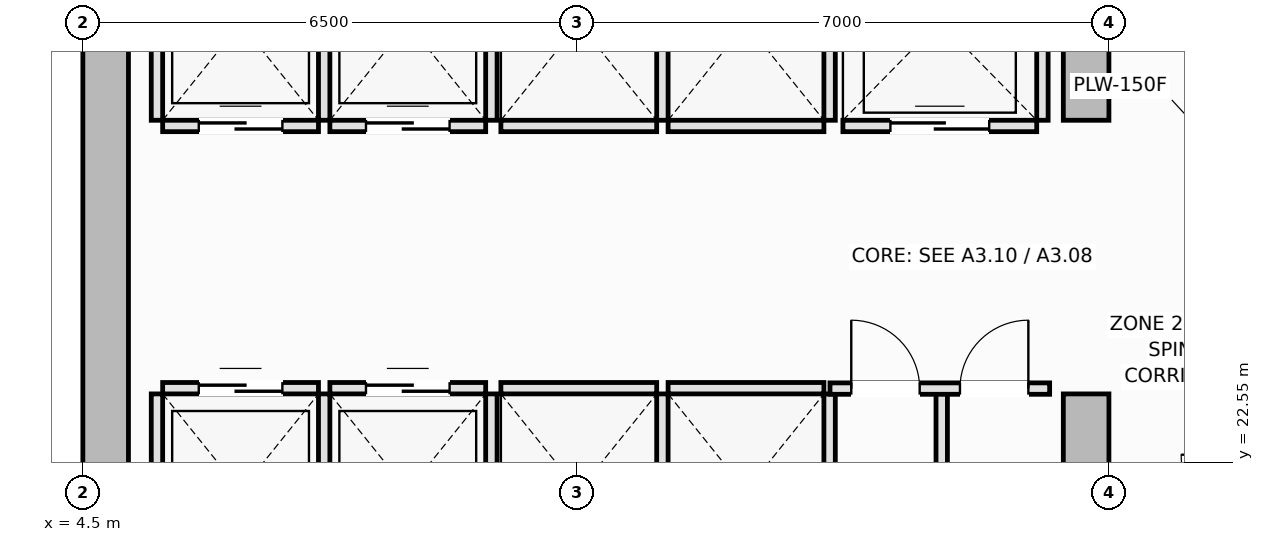
"""IFC4 building model, lengths in metres.
Left out: names, types, materials, properties, quantities, classifications, styles, units other than length and angle.
Written with IfcOpenShell. Run it as: python <this file> out.ifc"""

import sys

from ifc_helpers import new_model, si_unit, direction, frame, frame_2d, origin, place, context, subcontext, project, spatial, rectangle, extrude, element, fill, save


model = new_model("IFC4")
c1 = context("Model", 3, precision=1e-05, world=origin(), true_north=direction((0.0, 1.0)))
c2 = subcontext(c1, "Body", "Model", "MODEL_VIEW")
j1 = project(units=[si_unit("LENGTHUNIT", "METRE"), si_unit("PLANEANGLEUNIT", "RADIAN")], contexts=[c1])
p1 = place(None, origin())
s1 = spatial("IfcSite", under=j1, at=p1, CompositionType="ELEMENT")
p2 = place(p1, origin())
s2 = spatial("IfcBuilding", under=s1, at=p2, CompositionType="ELEMENT")
p3 = place(p2, frame((0.0, 0.0, 159.05)))
s3 = spatial("IfcBuildingStorey", under=s2, at=p3, CompositionType="ELEMENT", Elevation=159.05)
p4 = place(p3, frame((4.8, 14.6, 0.0), z_axis=(0.0, 0.0, 1.0), x_axis=(0.0, 1.0, 0.0)))
e1 = element("IfcWall", 1, at=p4, inside=s3, PredefinedType="SHEAR", context=c2, shape_type="SweptSolid", body=[
    extrude(rectangle(XDim=21.3, YDim=0.6, at=frame_2d((10.65, 0.0))), origin(), (0.0, 0.0, 1.0), 3.55),
])
p5 = place(p3, frame((17.7, 14.6, 0.0), z_axis=(0.0, 0.0, 1.0), x_axis=(0.0, 1.0, 0.0)))
e2 = element("IfcWall", 2, at=p5, inside=s3, PredefinedType="SHEAR", context=c2, shape_type="SweptSolid", body=[
    extrude(rectangle(XDim=8.85, YDim=0.6, at=frame_2d((4.425, 0.0))), origin(), (0.0, 0.0, 1.0), 3.55),
])
p6 = place(p5, frame((4.3, 0.0, 0.0)))
e3 = element("IfcOpeningElement", 3, at=p6, cuts=e2, PredefinedType="OPENING", context=c2, shape_type="SweptSolid", body=[
    extrude(rectangle(XDim=1.1, YDim=2.15, at=frame_2d((0.55, 1.075))), frame((0.0, 0.31, 0.0), z_axis=(0.0, -1.0, 0.0), x_axis=(1.0, 0.0, 0.0)), (0.0, 0.0, 1.0), 0.62),
])
p7 = place(p3, frame((17.7, 27.05, 0.0), z_axis=(0.0, 0.0, 1.0), x_axis=(0.0, 1.0, 0.0)))
e4 = element("IfcWall", 4, at=p7, inside=s3, PredefinedType="SHEAR", context=c2, shape_type="SweptSolid", body=[
    extrude(rectangle(XDim=8.85, YDim=0.6, at=frame_2d((4.425, 0.0))), origin(), (0.0, 0.0, 1.0), 3.55),
])
p8 = place(p7, frame((3.45, 0.0, 0.0)))
e5 = element("IfcOpeningElement", 5, at=p8, cuts=e4, PredefinedType="OPENING", context=c2, shape_type="SweptSolid", body=[
    extrude(rectangle(XDim=1.1, YDim=2.15, at=frame_2d((0.55, 1.075))), frame((0.0, 0.31, 0.0), z_axis=(0.0, -1.0, 0.0), x_axis=(1.0, 0.0, 0.0)), (0.0, 0.0, 1.0), 0.62),
])
p9 = place(p3, frame((5.55, 23.525, 0.0), z_axis=(0.0, 0.0, 1.0), x_axis=(1.0, 0.0, 0.0)))
e6 = element("IfcWall", 6, at=p9, inside=s3, PredefinedType="PARTITIONING", context=c2, shape_type="SweptSolid", body=[
    extrude(rectangle(XDim=2.05, YDim=0.15, at=frame_2d((1.025, 0.0))), origin(), (0.0, 0.0, 1.0), 3.37),
])
p10 = place(p9, frame((0.475, 0.0, 0.0)))
e7 = element("IfcOpeningElement", 7, at=p10, cuts=e6, PredefinedType="OPENING", context=c2, shape_type="SweptSolid", body=[
    extrude(rectangle(XDim=1.1, YDim=2.2, at=frame_2d((0.55, 1.1))), frame((0.0, 0.085, 0.0), z_axis=(0.0, -1.0, 0.0), x_axis=(1.0, 0.0, 0.0)), (0.0, 0.0, 1.0), 0.17),
])
for number, where, z_axis, x_axis in (
    (8, (5.475, 20.9, 0.0), (0.0, 0.0, 1.0), (0.0, 1.0, 0.0)),
    (9, (7.675, 20.9, 0.0), (0.0, 0.0, 1.0), (0.0, 1.0, 0.0)),
):
    element("IfcWall", number, at=place(p3, frame(where, z_axis=z_axis, x_axis=x_axis)), inside=s3, PredefinedType="PARTITIONING", context=c2, shape_type="SweptSolid", body=[
        extrude(rectangle(XDim=2.55, YDim=0.15, at=frame_2d((1.275, 0.0))), origin(), (0.0, 0.0, 1.0), 3.37),
    ])
p11 = place(p3, frame((7.75, 23.525, 0.0), z_axis=(0.0, 0.0, 1.0), x_axis=(1.0, 0.0, 0.0)))
e10 = element("IfcWall", 10, at=p11, inside=s3, PredefinedType="PARTITIONING", context=c2, shape_type="SweptSolid", body=[
    extrude(rectangle(XDim=2.05, YDim=0.15, at=frame_2d((1.025, 0.0))), origin(), (0.0, 0.0, 1.0), 3.37),
])
p12 = place(p11, frame((0.475, 0.0, 0.0)))
e11 = element("IfcOpeningElement", 11, at=p12, cuts=e10, PredefinedType="OPENING", context=c2, shape_type="SweptSolid", body=[
    extrude(rectangle(XDim=1.1, YDim=2.2, at=frame_2d((0.55, 1.1))), frame((0.0, 0.085, 0.0), z_axis=(0.0, -1.0, 0.0), x_axis=(1.0, 0.0, 0.0)), (0.0, 0.0, 1.0), 0.17),
])
p13 = place(p3, frame((9.875, 20.9, 0.0), z_axis=(0.0, 0.0, 1.0), x_axis=(0.0, 1.0, 0.0)))
e12 = element("IfcWall", 12, at=p13, inside=s3, PredefinedType="PARTITIONING", context=c2, shape_type="SweptSolid", body=[
    extrude(rectangle(XDim=2.55, YDim=0.15, at=frame_2d((1.275, 0.0))), origin(), (0.0, 0.0, 1.0), 3.37),
])
p14 = place(p3, frame((5.55, 26.975, 0.0), z_axis=(0.0, 0.0, 1.0), x_axis=(1.0, 0.0, 0.0)))
e13 = element("IfcWall", 13, at=p14, inside=s3, PredefinedType="PARTITIONING", context=c2, shape_type="SweptSolid", body=[
    extrude(rectangle(XDim=2.05, YDim=0.15, at=frame_2d((1.025, 0.0))), origin(), (0.0, 0.0, 1.0), 3.37),
])
p15 = place(p14, frame((0.475, 0.0, 0.0)))
e14 = element("IfcOpeningElement", 14, at=p15, cuts=e13, PredefinedType="OPENING", context=c2, shape_type="SweptSolid", body=[
    extrude(rectangle(XDim=1.1, YDim=2.2, at=frame_2d((0.55, 1.1))), frame((0.0, 0.085, 0.0), z_axis=(0.0, -1.0, 0.0), x_axis=(1.0, 0.0, 0.0)), (0.0, 0.0, 1.0), 0.17),
])
for number, where, z_axis, x_axis in (
    (15, (5.475, 27.05, 0.0), (0.0, 0.0, 1.0), (0.0, 1.0, 0.0)),
    (16, (7.675, 27.05, 0.0), (0.0, 0.0, 1.0), (0.0, 1.0, 0.0)),
):
    element("IfcWall", number, at=place(p3, frame(where, z_axis=z_axis, x_axis=x_axis)), inside=s3, PredefinedType="PARTITIONING", context=c2, shape_type="SweptSolid", body=[
        extrude(rectangle(XDim=2.55, YDim=0.15, at=frame_2d((1.275, 0.0))), origin(), (0.0, 0.0, 1.0), 3.37),
    ])
p16 = place(p3, frame((7.75, 26.975, 0.0), z_axis=(0.0, 0.0, 1.0), x_axis=(1.0, 0.0, 0.0)))
e17 = element("IfcWall", 17, at=p16, inside=s3, PredefinedType="PARTITIONING", context=c2, shape_type="SweptSolid", body=[
    extrude(rectangle(XDim=2.05, YDim=0.15, at=frame_2d((1.025, 0.0))), origin(), (0.0, 0.0, 1.0), 3.37),
])
p17 = place(p16, frame((0.475, 0.0, 0.0)))
e18 = element("IfcOpeningElement", 18, at=p17, cuts=e17, PredefinedType="OPENING", context=c2, shape_type="SweptSolid", body=[
    extrude(rectangle(XDim=1.1, YDim=2.2, at=frame_2d((0.55, 1.1))), frame((0.0, 0.085, 0.0), z_axis=(0.0, -1.0, 0.0), x_axis=(1.0, 0.0, 0.0)), (0.0, 0.0, 1.0), 0.17),
])
p18 = place(p3, frame((9.875, 27.05, 0.0), z_axis=(0.0, 0.0, 1.0), x_axis=(0.0, 1.0, 0.0)))
e19 = element("IfcWall", 19, at=p18, inside=s3, PredefinedType="PARTITIONING", context=c2, shape_type="SweptSolid", body=[
    extrude(rectangle(XDim=2.55, YDim=0.15, at=frame_2d((1.275, 0.0))), origin(), (0.0, 0.0, 1.0), 3.37),
])
p19 = place(p3, frame((10.0, 23.525, 0.0), z_axis=(0.0, 0.0, 1.0), x_axis=(1.0, 0.0, 0.0)))
e20 = element("IfcWall", 20, at=p19, inside=s3, PredefinedType="PARTITIONING", context=c2, shape_type="SweptSolid", body=[
    extrude(rectangle(XDim=2.05, YDim=0.15, at=frame_2d((1.025, 0.0))), origin(), (0.0, 0.0, 1.0), 3.37),
])
p20 = place(p3, frame((12.125, 20.9, 0.0), z_axis=(0.0, 0.0, 1.0), x_axis=(0.0, 1.0, 0.0)))
e21 = element("IfcWall", 21, at=p20, inside=s3, PredefinedType="PARTITIONING", context=c2, shape_type="SweptSolid", body=[
    extrude(rectangle(XDim=2.55, YDim=0.15, at=frame_2d((1.275, 0.0))), origin(), (0.0, 0.0, 1.0), 3.37),
])
p21 = place(p3, frame((12.2, 23.525, 0.0), z_axis=(0.0, 0.0, 1.0), x_axis=(1.0, 0.0, 0.0)))
e22 = element("IfcWall", 22, at=p21, inside=s3, PredefinedType="PARTITIONING", context=c2, shape_type="SweptSolid", body=[
    extrude(rectangle(XDim=2.05, YDim=0.15, at=frame_2d((1.025, 0.0))), origin(), (0.0, 0.0, 1.0), 3.37),
])
p22 = place(p3, frame((14.325, 20.9, 0.0), z_axis=(0.0, 0.0, 1.0), x_axis=(0.0, 1.0, 0.0)))
e23 = element("IfcWall", 23, at=p22, inside=s3, PredefinedType="PARTITIONING", context=c2, shape_type="SweptSolid", body=[
    extrude(rectangle(XDim=2.55, YDim=0.15, at=frame_2d((1.275, 0.0))), origin(), (0.0, 0.0, 1.0), 3.37),
])
p23 = place(p3, frame((10.0, 26.975, 0.0), z_axis=(0.0, 0.0, 1.0), x_axis=(1.0, 0.0, 0.0)))
e24 = element("IfcWall", 24, at=p23, inside=s3, PredefinedType="PARTITIONING", context=c2, shape_type="SweptSolid", body=[
    extrude(rectangle(XDim=2.05, YDim=0.15, at=frame_2d((1.025, 0.0))), origin(), (0.0, 0.0, 1.0), 3.37),
])
p24 = place(p3, frame((12.125, 27.05, 0.0), z_axis=(0.0, 0.0, 1.0), x_axis=(0.0, 1.0, 0.0)))
e25 = element("IfcWall", 25, at=p24, inside=s3, PredefinedType="PARTITIONING", context=c2, shape_type="SweptSolid", body=[
    extrude(rectangle(XDim=2.55, YDim=0.15, at=frame_2d((1.275, 0.0))), origin(), (0.0, 0.0, 1.0), 3.37),
])
p25 = place(p3, frame((12.2, 26.975, 0.0), z_axis=(0.0, 0.0, 1.0), x_axis=(1.0, 0.0, 0.0)))
e26 = element("IfcWall", 26, at=p25, inside=s3, PredefinedType="PARTITIONING", context=c2, shape_type="SweptSolid", body=[
    extrude(rectangle(XDim=2.05, YDim=0.15, at=frame_2d((1.025, 0.0))), origin(), (0.0, 0.0, 1.0), 3.37),
])
p26 = place(p3, frame((14.325, 27.05, 0.0), z_axis=(0.0, 0.0, 1.0), x_axis=(0.0, 1.0, 0.0)))
e27 = element("IfcWall", 27, at=p26, inside=s3, PredefinedType="PARTITIONING", context=c2, shape_type="SweptSolid", body=[
    extrude(rectangle(XDim=2.55, YDim=0.15, at=frame_2d((1.275, 0.0))), origin(), (0.0, 0.0, 1.0), 3.37),
])
p27 = place(p3, frame((14.5, 26.975, 0.0), z_axis=(0.0, 0.0, 1.0), x_axis=(1.0, 0.0, 0.0)))
e28 = element("IfcWall", 28, at=p27, inside=s3, PredefinedType="PARTITIONING", context=c2, shape_type="SweptSolid", body=[
    extrude(rectangle(XDim=2.55, YDim=0.15, at=frame_2d((1.275, 0.0))), origin(), (0.0, 0.0, 1.0), 3.37),
])
p28 = place(p27, frame((0.625, 0.0, 0.0)))
e29 = element("IfcOpeningElement", 29, at=p28, cuts=e28, PredefinedType="OPENING", context=c2, shape_type="SweptSolid", body=[
    extrude(rectangle(XDim=1.3, YDim=2.2, at=frame_2d((0.65, 1.1))), frame((0.0, 0.085, 0.0), z_axis=(0.0, -1.0, 0.0), x_axis=(1.0, 0.0, 0.0)), (0.0, 0.0, 1.0), 0.17),
])
p29 = place(p3, frame((17.125, 27.05, 0.0), z_axis=(0.0, 0.0, 1.0), x_axis=(0.0, 1.0, 0.0)))
e30 = element("IfcWall", 30, at=p29, inside=s3, PredefinedType="PARTITIONING", context=c2, shape_type="SweptSolid", body=[
    extrude(rectangle(XDim=2.6, YDim=0.15, at=frame_2d((1.3, 0.0))), origin(), (0.0, 0.0, 1.0), 3.37),
])
p30 = place(p3, frame((15.8, 20.85, 0.0), z_axis=(0.0, 0.0, 1.0), x_axis=(0.0, 1.0, 0.0)))
e31 = element("IfcWall", 31, at=p30, inside=s3, PredefinedType="PARTITIONING", context=c2, shape_type="SweptSolid", body=[
    extrude(rectangle(XDim=2.67, YDim=0.15, at=frame_2d((1.335, 0.0))), origin(), (0.0, 0.0, 1.0), 3.37),
])
p31 = place(p3, frame((14.33, 23.52, 0.0), z_axis=(0.0, 0.0, 1.0), x_axis=(1.0, 0.0, 0.0)))
e32 = element("IfcWall", 32, at=p31, inside=s3, PredefinedType="PARTITIONING", context=c2, shape_type="SweptSolid", body=[
    extrude(rectangle(XDim=2.89, YDim=0.15, at=frame_2d((1.445, 0.0))), origin(), (0.0, 0.0, 1.0), 3.37),
])
p32 = place(p31, frame((0.28, 0.0, 0.0)))
e33 = element("IfcOpeningElement", 33, at=p32, cuts=e32, PredefinedType="OPENING", context=c2, shape_type="SweptSolid", body=[
    extrude(rectangle(XDim=0.9, YDim=2.1, at=frame_2d((0.45, 1.05))), frame((0.0, 0.085, 0.0), z_axis=(0.0, -1.0, 0.0), x_axis=(1.0, 0.0, 0.0)), (0.0, 0.0, 1.0), 0.17),
])
p33 = place(p31, frame((1.71, 0.0, 0.0)))
e34 = element("IfcOpeningElement", 34, at=p33, cuts=e32, PredefinedType="OPENING", context=c2, shape_type="SweptSolid", body=[
    extrude(rectangle(XDim=0.9, YDim=2.1, at=frame_2d((0.45, 1.05))), frame((0.0, 0.085, 0.0), z_axis=(0.0, -1.0, 0.0), x_axis=(1.0, 0.0, 0.0)), (0.0, 0.0, 1.0), 0.17),
])
p34 = place(p10, origin())
e35 = element("IfcDoor", 35, at=p34, inside=s3, OperationType="DOUBLE_DOOR_SLIDING", PredefinedType="DOOR", context=c2, shape_type="SweptSolid", body=[
    extrude(rectangle(XDim=1.1, YDim=2.2, at=frame_2d((0.55, 1.1))), frame((0.0, 0.025, 0.0), z_axis=(0.0, -1.0, 0.0), x_axis=(1.0, 0.0, 0.0)), (0.0, 0.0, 1.0), 0.05),
])
fill(e7, e35)
p35 = place(p12, origin())
e36 = element("IfcDoor", 36, at=p35, inside=s3, OperationType="DOUBLE_DOOR_SLIDING", PredefinedType="DOOR", context=c2, shape_type="SweptSolid", body=[
    extrude(rectangle(XDim=1.1, YDim=2.2, at=frame_2d((0.55, 1.1))), frame((0.0, 0.025, 0.0), z_axis=(0.0, -1.0, 0.0), x_axis=(1.0, 0.0, 0.0)), (0.0, 0.0, 1.0), 0.05),
])
fill(e11, e36)
p36 = place(p15, origin())
e37 = element("IfcDoor", 37, at=p36, inside=s3, OperationType="DOUBLE_DOOR_SLIDING", PredefinedType="DOOR", context=c2, shape_type="SweptSolid", body=[
    extrude(rectangle(XDim=1.1, YDim=2.2, at=frame_2d((0.55, 1.1))), frame((0.0, 0.025, 0.0), z_axis=(0.0, -1.0, 0.0), x_axis=(1.0, 0.0, 0.0)), (0.0, 0.0, 1.0), 0.05),
])
fill(e14, e37)
p37 = place(p17, origin())
e38 = element("IfcDoor", 38, at=p37, inside=s3, OperationType="DOUBLE_DOOR_SLIDING", PredefinedType="DOOR", context=c2, shape_type="SweptSolid", body=[
    extrude(rectangle(XDim=1.1, YDim=2.2, at=frame_2d((0.55, 1.1))), frame((0.0, 0.025, 0.0), z_axis=(0.0, -1.0, 0.0), x_axis=(1.0, 0.0, 0.0)), (0.0, 0.0, 1.0), 0.05),
])
fill(e18, e38)
p38 = place(p28, origin())
e39 = element("IfcDoor", 39, at=p38, inside=s3, OperationType="DOUBLE_DOOR_SLIDING", PredefinedType="DOOR", context=c2, shape_type="SweptSolid", body=[
    extrude(rectangle(XDim=1.3, YDim=2.2, at=frame_2d((0.65, 1.1))), frame((0.0, 0.025, 0.0), z_axis=(0.0, -1.0, 0.0), x_axis=(1.0, 0.0, 0.0)), (0.0, 0.0, 1.0), 0.05),
])
fill(e29, e39)
p39 = place(p32, origin())
e40 = element("IfcDoor", 40, at=p39, inside=s3, OperationType="SINGLE_SWING_LEFT", PredefinedType="DOOR", context=c2, shape_type="SweptSolid", body=[
    extrude(rectangle(XDim=0.9, YDim=2.1, at=frame_2d((0.45, 1.05))), frame((0.0, 0.025, 0.0), z_axis=(0.0, -1.0, 0.0), x_axis=(1.0, 0.0, 0.0)), (0.0, 0.0, 1.0), 0.05),
])
fill(e33, e40)
p40 = place(p33, origin())
e41 = element("IfcDoor", 41, at=p40, inside=s3, OperationType="SINGLE_SWING_RIGHT", PredefinedType="DOOR", context=c2, shape_type="SweptSolid", body=[
    extrude(rectangle(XDim=0.9, YDim=2.1, at=frame_2d((0.45, 1.05))), frame((0.0, 0.025, 0.0), z_axis=(0.0, -1.0, 0.0), x_axis=(1.0, 0.0, 0.0)), (0.0, 0.0, 1.0), 0.05),
])
fill(e34, e41)
save(model, sys.argv[1])
